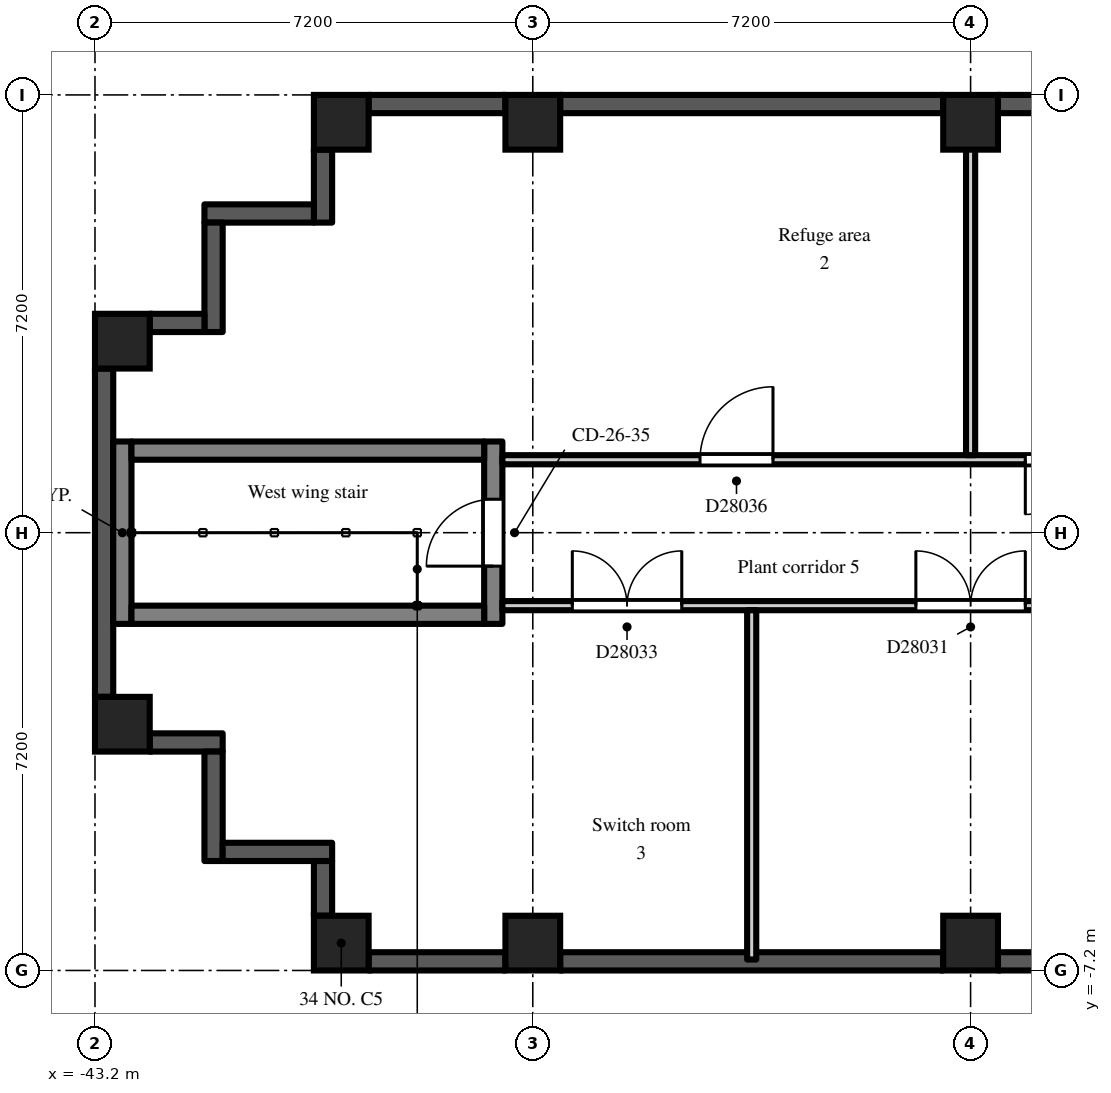
"""IFC4 building model, lengths in metres.
Left out: names, types, materials, properties, quantities, classifications, styles, units other than length and angle.
Written with IfcOpenShell. Run it as: python <this file> out.ifc"""

import sys

from ifc_helpers import new_model, si_unit, direction, frame, frame_2d, origin, origin_2d, place, context, subcontext, project, spatial, polyline, rectangle, outline, extrude, element, fill, save


model = new_model("IFC4")
c1 = context("Model", 3, precision=1e-05, world=origin(), true_north=direction((0.0, 1.0)))
c2 = subcontext(c1, "Body", "Model", "MODEL_VIEW")
j1 = project(units=[si_unit("LENGTHUNIT", "METRE"), si_unit("PLANEANGLEUNIT", "RADIAN")], contexts=[c1])
p1 = place(None, origin())
s1 = spatial("IfcSite", under=j1, at=p1, CompositionType="ELEMENT")
p2 = place(p1, origin())
s2 = spatial("IfcBuilding", under=s1, at=p2, CompositionType="ELEMENT")
p3 = place(p2, frame((0.0, 0.0, 194.7)))
s3 = spatial("IfcBuildingStorey", under=s2, at=p3, CompositionType="ELEMENT", Elevation=194.7)
for number, where, z_axis, x_axis in (
    (1, (-42.75, -3.15, 0.0), (0.0, 0.0, 1.0), (1.0, 0.0, 0.0)),
    (2, (-42.75, 3.15, 0.0), (0.0, 0.0, 1.0), (1.0, 0.0, 0.0)),
    (3, (-39.15, -6.75, 0.0), (0.0, 0.0, 1.0), (1.0, 0.0, 0.0)),
    (4, (-39.15, 6.75, 0.0), (0.0, 0.0, 1.0), (1.0, 0.0, 0.0)),
    (5, (-36.0, -6.75, 0.0), (0.0, 0.0, 1.0), (1.0, 0.0, 0.0)),
    (6, (-36.0, 6.75, 0.0), (0.0, 0.0, 1.0), (1.0, 0.0, 0.0)),
    (7, (-28.8, -6.75, 0.0), (0.0, 0.0, 1.0), (1.0, 0.0, 0.0)),
    (8, (-28.8, 6.75, 0.0), (0.0, 0.0, 1.0), (1.0, 0.0, 0.0)),
):
    element("IfcColumn", number, at=place(p3, frame(where, z_axis=z_axis, x_axis=x_axis)), inside=s3, PredefinedType="COLUMN", context=c2, shape_type="SweptSolid", body=[
        extrude(rectangle(XDim=0.9, YDim=0.9, at=origin_2d()), origin(), (0.0, 0.0, 1.0), 4.2),
    ])
p4 = place(p3, frame((-25.2, 7.05, 0.0), z_axis=(0.0, 0.0, 1.0), x_axis=(-1.0, 0.0, 0.0)))
e9 = element("IfcWall", 9, at=p4, inside=s3, PredefinedType="SOLIDWALL", context=c2, shape_type="SweptSolid", body=[
    extrude(rectangle(XDim=3.15, YDim=0.3, at=frame_2d((1.575, 0.0))), origin(), (0.0, 0.0, 1.0), 3.8),
])
p5 = place(p3, frame((-29.25, 7.05, 0.0), z_axis=(0.0, 0.0, 1.0), x_axis=(-1.0, 0.0, 0.0)))
e10 = element("IfcWall", 10, at=p5, inside=s3, PredefinedType="SOLIDWALL", context=c2, shape_type="SweptSolid", body=[
    extrude(outline(polyline([(0.0, 0.0), (6.3, 0.0), (6.3, 3.8), (1.952, 3.8), (1.95, 3.4), (1.15, 3.4), (1.148, 3.8), (0.0, 3.8), (0.0, 0.0)])), frame((0.0, 0.15, 0.0), z_axis=(0.0, -1.0, 0.0), x_axis=(1.0, 0.0, 0.0)), (0.0, 0.0, 1.0), 0.3),
])
p6 = place(p3, frame((-36.45, 7.05, 0.0), z_axis=(0.0, 0.0, 1.0), x_axis=(-1.0, 0.0, 0.0)))
e11 = element("IfcWall", 11, at=p6, inside=s3, PredefinedType="SOLIDWALL", context=c2, shape_type="SweptSolid", body=[
    extrude(rectangle(XDim=2.25, YDim=0.3, at=frame_2d((1.125, 0.0))), origin(), (0.0, 0.0, 1.0), 3.8),
])
p7 = place(p3, frame((-39.45, 6.3, 0.0), z_axis=(0.0, 0.0, 1.0), x_axis=(0.0, -1.0, 0.0)))
e12 = element("IfcWall", 12, at=p7, inside=s3, PredefinedType="SOLIDWALL", context=c2, shape_type="SweptSolid", body=[
    extrude(rectangle(XDim=1.2, YDim=0.3, at=frame_2d((0.6, 0.0))), origin(), (0.0, 0.0, 1.0), 3.8),
])
p8 = place(p3, frame((-39.6, 5.25, 0.0), z_axis=(0.0, 0.0, 1.0), x_axis=(-1.0, 0.0, 0.0)))
e13 = element("IfcWall", 13, at=p8, inside=s3, PredefinedType="SOLIDWALL", context=c2, shape_type="SweptSolid", body=[
    extrude(rectangle(XDim=1.8, YDim=0.3, at=frame_2d((0.9, 0.0))), origin(), (0.0, 0.0, 1.0), 3.8),
])
p9 = place(p3, frame((-41.25, 5.1, 0.0), z_axis=(0.0, 0.0, 1.0), x_axis=(0.0, -1.0, 0.0)))
e14 = element("IfcWall", 14, at=p9, inside=s3, PredefinedType="SOLIDWALL", context=c2, shape_type="SweptSolid", body=[
    extrude(rectangle(XDim=1.8, YDim=0.3, at=frame_2d((0.9, 0.0))), origin(), (0.0, 0.0, 1.0), 3.8),
])
p10 = place(p3, frame((-41.4, 3.45, 0.0), z_axis=(0.0, 0.0, 1.0), x_axis=(-1.0, 0.0, 0.0)))
e15 = element("IfcWall", 15, at=p10, inside=s3, PredefinedType="SOLIDWALL", context=c2, shape_type="SweptSolid", body=[
    extrude(rectangle(XDim=0.9, YDim=0.3, at=frame_2d((0.45, 0.0))), origin(), (0.0, 0.0, 1.0), 3.8),
])
p11 = place(p3, frame((-43.05, 2.7, 0.0), z_axis=(0.0, 0.0, 1.0), x_axis=(0.0, -1.0, 0.0)))
e16 = element("IfcWall", 16, at=p11, inside=s3, PredefinedType="SOLIDWALL", context=c2, shape_type="SweptSolid", body=[
    extrude(rectangle(XDim=5.4, YDim=0.3, at=frame_2d((2.7, 0.0))), origin(), (0.0, 0.0, 1.0), 3.8),
])
p12 = place(p3, frame((-42.3, -3.45, 0.0), z_axis=(0.0, 0.0, 1.0), x_axis=(1.0, 0.0, 0.0)))
e17 = element("IfcWall", 17, at=p12, inside=s3, PredefinedType="SOLIDWALL", context=c2, shape_type="SweptSolid", body=[
    extrude(rectangle(XDim=1.2, YDim=0.3, at=frame_2d((0.6, 0.0))), origin(), (0.0, 0.0, 1.0), 3.8),
])
p13 = place(p3, frame((-41.25, -3.6, 0.0), z_axis=(0.0, 0.0, 1.0), x_axis=(0.0, -1.0, 0.0)))
e18 = element("IfcWall", 18, at=p13, inside=s3, PredefinedType="SOLIDWALL", context=c2, shape_type="SweptSolid", body=[
    extrude(rectangle(XDim=1.8, YDim=0.3, at=frame_2d((0.9, 0.0))), origin(), (0.0, 0.0, 1.0), 3.8),
])
p14 = place(p3, frame((-41.1, -5.25, 0.0), z_axis=(0.0, 0.0, 1.0), x_axis=(1.0, 0.0, 0.0)))
e19 = element("IfcWall", 19, at=p14, inside=s3, PredefinedType="SOLIDWALL", context=c2, shape_type="SweptSolid", body=[
    extrude(rectangle(XDim=1.8, YDim=0.3, at=frame_2d((0.9, 0.0))), origin(), (0.0, 0.0, 1.0), 3.8),
])
p15 = place(p3, frame((-39.45, -5.4, 0.0), z_axis=(0.0, 0.0, 1.0), x_axis=(0.0, -1.0, 0.0)))
e20 = element("IfcWall", 20, at=p15, inside=s3, PredefinedType="SOLIDWALL", context=c2, shape_type="SweptSolid", body=[
    extrude(rectangle(XDim=0.9, YDim=0.3, at=frame_2d((0.45, 0.0))), origin(), (0.0, 0.0, 1.0), 3.8),
])
p16 = place(p3, frame((-38.7, -7.05, 0.0), z_axis=(0.0, 0.0, 1.0), x_axis=(1.0, 0.0, 0.0)))
e21 = element("IfcWall", 21, at=p16, inside=s3, PredefinedType="SOLIDWALL", context=c2, shape_type="SweptSolid", body=[
    extrude(rectangle(XDim=2.25, YDim=0.3, at=frame_2d((1.125, 0.0))), origin(), (0.0, 0.0, 1.0), 3.8),
])
p17 = place(p3, frame((-35.55, -7.05, 0.0), z_axis=(0.0, 0.0, 1.0), x_axis=(1.0, 0.0, 0.0)))
e22 = element("IfcWall", 22, at=p17, inside=s3, PredefinedType="SOLIDWALL", context=c2, shape_type="SweptSolid", body=[
    extrude(outline(polyline([(0.0, 0.0), (6.3, 0.0), (6.3, 3.8), (5.152, 3.8), (5.15, 3.4), (4.35, 3.4), (4.348, 3.8), (0.0, 3.8), (0.0, 0.0)])), frame((0.0, 0.15, 0.0), z_axis=(0.0, -1.0, 0.0), x_axis=(1.0, 0.0, 0.0)), (0.0, 0.0, 1.0), 0.3),
])
p18 = place(p3, frame((-28.35, -7.05, 0.0), z_axis=(0.0, 0.0, 1.0), x_axis=(1.0, 0.0, 0.0)))
e23 = element("IfcWall", 23, at=p18, inside=s3, PredefinedType="SOLIDWALL", context=c2, shape_type="SweptSolid", body=[
    extrude(rectangle(XDim=3.15, YDim=0.3, at=frame_2d((1.575, 0.0))), origin(), (0.0, 0.0, 1.0), 3.8),
])
p19 = place(p3, frame((-36.65, -1.5, 0.0), z_axis=(0.0, 0.0, 1.0), x_axis=(0.0, 1.0, 0.0)))
e24 = element("IfcWall", 24, at=p19, inside=s3, PredefinedType="SHEAR", context=c2, shape_type="SweptSolid", body=[
    extrude(rectangle(XDim=3.0, YDim=0.3, at=frame_2d((1.5, 0.0))), origin(), (0.0, 0.0, 1.0), 3.8),
])
p20 = place(p19, frame((0.95, 0.0, 0.0)))
e25 = element("IfcOpeningElement", 25, at=p20, cuts=e24, PredefinedType="OPENING", context=c2, shape_type="SweptSolid", body=[
    extrude(rectangle(XDim=1.1, YDim=2.1, at=frame_2d((0.55, 1.05))), frame((0.0, 0.16, 0.0), z_axis=(0.0, -1.0, 0.0), x_axis=(1.0, 0.0, 0.0)), (0.0, 0.0, 1.0), 0.32),
])
p21 = place(p3, frame((-42.75, -1.5, 0.0), z_axis=(0.0, 0.0, 1.0), x_axis=(0.0, 1.0, 0.0)))
e26 = element("IfcWall", 26, at=p21, inside=s3, PredefinedType="SHEAR", context=c2, shape_type="SweptSolid", body=[
    extrude(rectangle(XDim=3.0, YDim=0.3, at=frame_2d((1.5, 0.0))), origin(), (0.0, 0.0, 1.0), 3.8),
])
for number, where, z_axis, x_axis in (
    (27, (-36.8, -1.35, 0.0), (0.0, 0.0, 1.0), (-1.0, 0.0, 0.0)),
    (28, (-36.8, 1.35, 0.0), (0.0, 0.0, 1.0), (-1.0, 0.0, 0.0)),
):
    element("IfcWall", number, at=place(p3, frame(where, z_axis=z_axis, x_axis=x_axis)), inside=s3, PredefinedType="SHEAR", context=c2, shape_type="SweptSolid", body=[
        extrude(rectangle(XDim=5.8, YDim=0.3, at=frame_2d((2.9, 0.0))), origin(), (0.0, 0.0, 1.0), 3.8),
    ])
p22 = place(p3, frame((-36.5, -1.2, 0.0), z_axis=(0.0, 0.0, 1.0), x_axis=(1.0, 0.0, 0.0)))
e29 = element("IfcWall", 29, at=p22, inside=s3, PredefinedType="PARTITIONING", context=c2, shape_type="SweptSolid", body=[
    extrude(outline(polyline([(0.0, 0.0), (14.9, 0.0), (14.9, 3.8), (6.102, 3.8), (6.1, 3.4), (5.3, 3.4), (5.298, 3.8), (0.0, 3.8), (0.0, 0.0)])), frame((0.0, 0.075, 0.0), z_axis=(0.0, -1.0, 0.0), x_axis=(1.0, 0.0, 0.0)), (0.0, 0.0, 1.0), 0.15),
])
p23 = place(p22, frame((6.8, 0.0, 0.0)))
e30 = element("IfcOpeningElement", 30, at=p23, cuts=e29, PredefinedType="OPENING", context=c2, shape_type="SweptSolid", body=[
    extrude(rectangle(XDim=1.8, YDim=2.1, at=frame_2d((0.9, 1.05))), frame((0.0, 0.085, 0.0), z_axis=(0.0, -1.0, 0.0), x_axis=(1.0, 0.0, 0.0)), (0.0, 0.0, 1.0), 0.17),
])
p24 = place(p22, frame((12.45, 0.0, 0.0)))
e31 = element("IfcOpeningElement", 31, at=p24, cuts=e29, PredefinedType="OPENING", context=c2, shape_type="SweptSolid", body=[
    extrude(rectangle(XDim=1.8, YDim=2.1, at=frame_2d((0.9, 1.05))), frame((0.0, 0.085, 0.0), z_axis=(0.0, -1.0, 0.0), x_axis=(1.0, 0.0, 0.0)), (0.0, 0.0, 1.0), 0.17),
])
p25 = place(p22, frame((1.15, 0.0, 0.0)))
e32 = element("IfcOpeningElement", 32, at=p25, cuts=e29, PredefinedType="OPENING", context=c2, shape_type="SweptSolid", body=[
    extrude(rectangle(XDim=1.8, YDim=2.1, at=frame_2d((0.9, 1.05))), frame((0.0, 0.085, 0.0), z_axis=(0.0, -1.0, 0.0), x_axis=(1.0, 0.0, 0.0)), (0.0, 0.0, 1.0), 0.17),
])
p26 = place(p3, frame((-36.5, 1.2, 0.0), z_axis=(0.0, 0.0, 1.0), x_axis=(1.0, 0.0, 0.0)))
e33 = element("IfcWall", 33, at=p26, inside=s3, PredefinedType="PARTITIONING", context=c2, shape_type="SweptSolid", body=[
    extrude(outline(polyline([(0.0, 0.0), (14.9, 0.0), (14.9, 3.8), (6.102, 3.8), (6.1, 3.4), (5.3, 3.4), (5.298, 3.8), (0.0, 3.8), (0.0, 0.0)])), frame((0.0, 0.075, 0.0), z_axis=(0.0, -1.0, 0.0), x_axis=(1.0, 0.0, 0.0)), (0.0, 0.0, 1.0), 0.15),
])
p27 = place(p26, frame((8.6, 0.0, 0.0)))
e34 = element("IfcOpeningElement", 34, at=p27, cuts=e33, PredefinedType="OPENING", context=c2, shape_type="SweptSolid", body=[
    extrude(rectangle(XDim=1.8, YDim=2.1, at=frame_2d((0.9, 1.05))), frame((0.0, 0.085, 0.0), z_axis=(0.0, -1.0, 0.0), x_axis=(1.0, 0.0, 0.0)), (0.0, 0.0, 1.0), 0.17),
])
p28 = place(p26, frame((12.85, 0.0, 0.0)))
e35 = element("IfcOpeningElement", 35, at=p28, cuts=e33, PredefinedType="OPENING", context=c2, shape_type="SweptSolid", body=[
    extrude(rectangle(XDim=1.2, YDim=2.1, at=frame_2d((0.6, 1.05))), frame((0.0, 0.085, 0.0), z_axis=(0.0, -1.0, 0.0), x_axis=(1.0, 0.0, 0.0)), (0.0, 0.0, 1.0), 0.17),
])
p29 = place(p26, frame((3.25, 0.0, 0.0)))
e36 = element("IfcOpeningElement", 36, at=p29, cuts=e33, PredefinedType="OPENING", context=c2, shape_type="SweptSolid", body=[
    extrude(rectangle(XDim=1.2, YDim=2.1, at=frame_2d((0.6, 1.05))), frame((0.0, 0.085, 0.0), z_axis=(0.0, -1.0, 0.0), x_axis=(1.0, 0.0, 0.0)), (0.0, 0.0, 1.0), 0.17),
])
p30 = place(p3, frame((-32.4, -7.02, 0.0), z_axis=(0.0, 0.0, 1.0), x_axis=(0.0, 1.0, 0.0)))
e37 = element("IfcWall", 37, at=p30, inside=s3, PredefinedType="PARTITIONING", context=c2, shape_type="SweptSolid", body=[
    extrude(rectangle(XDim=5.745, YDim=0.15, at=frame_2d((2.873, 0.0))), origin(), (0.0, 0.0, 1.0), 3.8),
])
p31 = place(p3, frame((-28.8, 1.275, 0.0), z_axis=(0.0, 0.0, 1.0), x_axis=(0.0, 1.0, 0.0)))
e38 = element("IfcWall", 38, at=p31, inside=s3, PredefinedType="PARTITIONING", context=c2, shape_type="SweptSolid", body=[
    extrude(rectangle(XDim=5.625, YDim=0.15, at=frame_2d((2.812, 0.0))), origin(), (0.0, 0.0, 1.0), 2.3),
])
p32 = place(p20, origin())
e39 = element("IfcDoor", 39, at=p32, inside=s3, OperationType="SINGLE_SWING_LEFT", PredefinedType="DOOR", context=c2, shape_type="SweptSolid", body=[
    extrude(rectangle(XDim=1.1, YDim=2.1, at=frame_2d((0.55, 1.05))), frame((0.0, 0.025, 0.0), z_axis=(0.0, -1.0, 0.0), x_axis=(1.0, 0.0, 0.0)), (0.0, 0.0, 1.0), 0.05),
])
fill(e25, e39)
p33 = place(p23, origin())
e40 = element("IfcDoor", 40, at=p33, inside=s3, OperationType="DOUBLE_DOOR_DOUBLE_SWING", PredefinedType="DOOR", context=c2, shape_type="SweptSolid", body=[
    extrude(rectangle(XDim=1.8, YDim=2.1, at=frame_2d((0.9, 1.05))), frame((0.0, 0.025, 0.0), z_axis=(0.0, -1.0, 0.0), x_axis=(1.0, 0.0, 0.0)), (0.0, 0.0, 1.0), 0.05),
])
fill(e30, e40)
p34 = place(p25, origin())
e41 = element("IfcDoor", 41, at=p34, inside=s3, OperationType="DOUBLE_DOOR_DOUBLE_SWING", PredefinedType="DOOR", context=c2, shape_type="SweptSolid", body=[
    extrude(rectangle(XDim=1.8, YDim=2.1, at=frame_2d((0.9, 1.05))), frame((0.0, 0.025, 0.0), z_axis=(0.0, -1.0, 0.0), x_axis=(1.0, 0.0, 0.0)), (0.0, 0.0, 1.0), 0.05),
])
fill(e32, e41)
p35 = place(p27, frame((1.8, 0.0, 0.0), z_axis=(0.0, 0.0, 1.0), x_axis=(-1.0, 0.0, 0.0)))
e42 = element("IfcDoor", 42, at=p35, inside=s3, OperationType="DOUBLE_DOOR_DOUBLE_SWING", PredefinedType="DOOR", context=c2, shape_type="SweptSolid", body=[
    extrude(rectangle(XDim=1.8, YDim=2.1, at=frame_2d((0.9, 1.05))), frame((0.0, 0.025, 0.0), z_axis=(0.0, -1.0, 0.0), x_axis=(1.0, 0.0, 0.0)), (0.0, 0.0, 1.0), 0.05),
])
fill(e34, e42)
p36 = place(p29, origin())
e43 = element("IfcDoor", 43, at=p36, inside=s3, OperationType="SINGLE_SWING_RIGHT", PredefinedType="DOOR", context=c2, shape_type="SweptSolid", body=[
    extrude(rectangle(XDim=1.2, YDim=2.1, at=frame_2d((0.6, 1.05))), frame((0.0, 0.025, 0.0), z_axis=(0.0, -1.0, 0.0), x_axis=(1.0, 0.0, 0.0)), (0.0, 0.0, 1.0), 0.05),
])
fill(e36, e43)
save(model, sys.argv[1])
